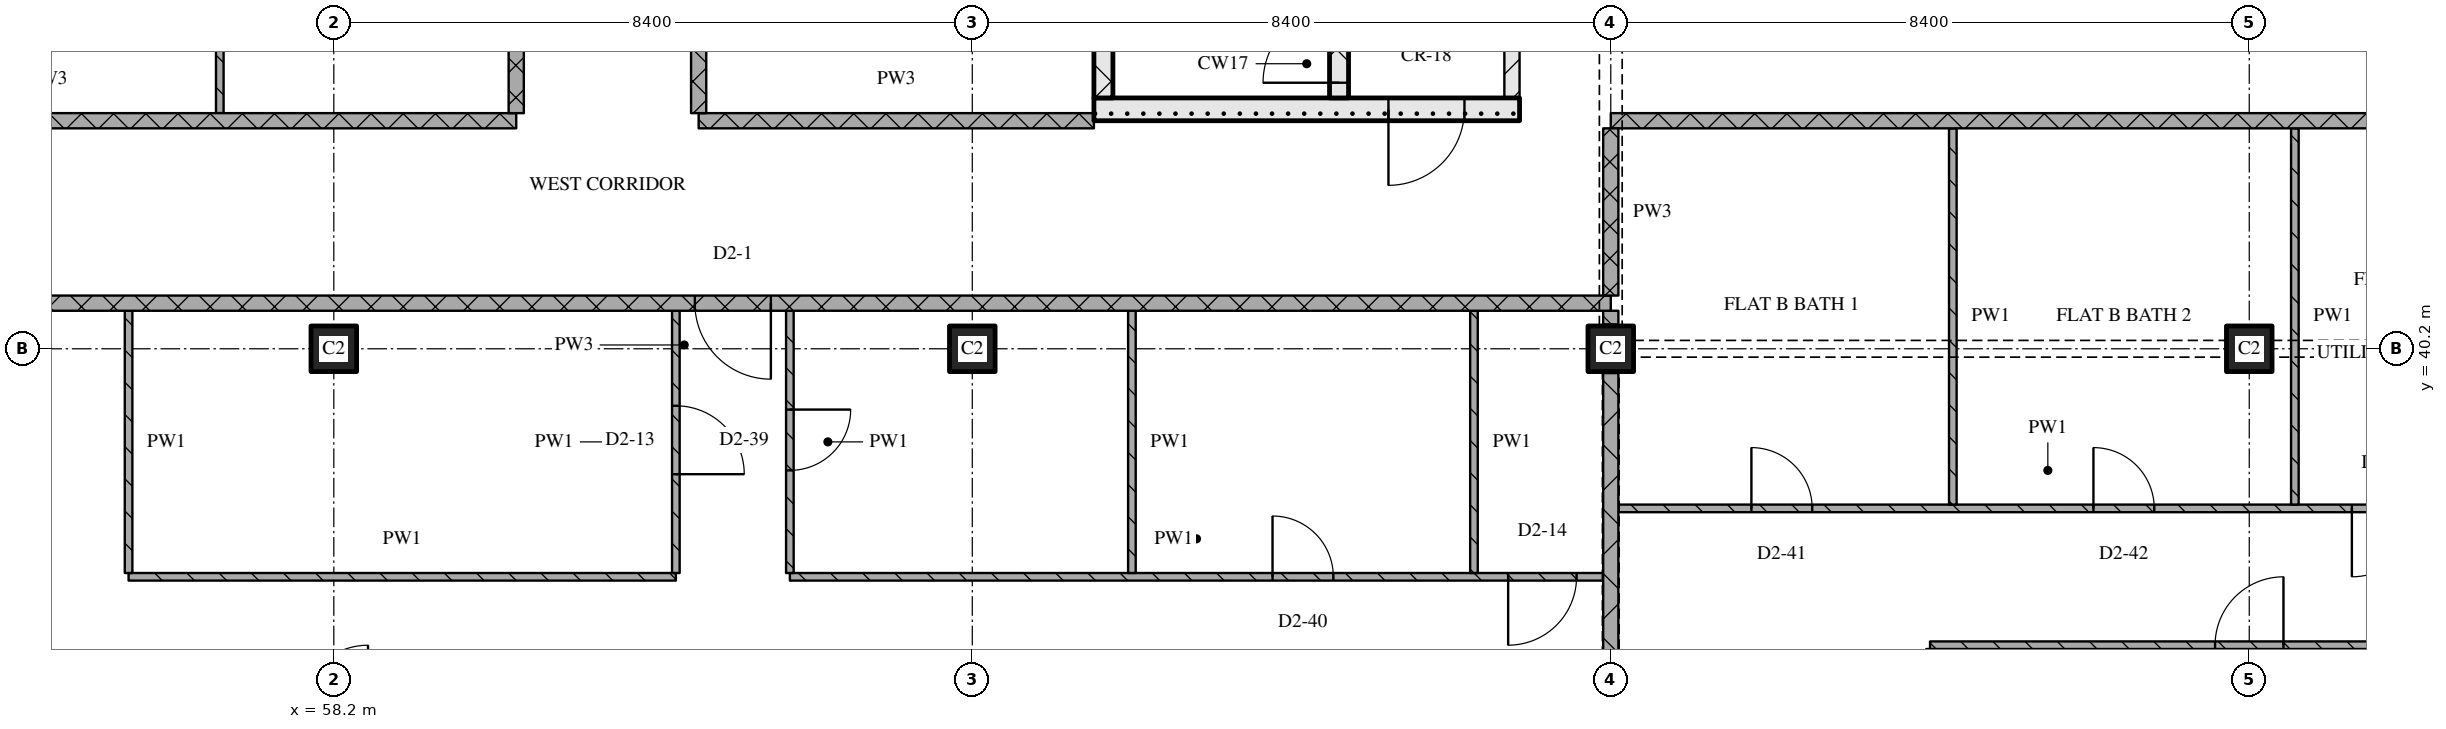
"""IFC4 building model, lengths in metres.
Left out: names, types, materials, properties, quantities, classifications, styles, units other than length and angle.
Written with IfcOpenShell. Run it as: python <this file> out.ifc"""

import sys

from ifc_helpers import new_model, si_unit, direction, frame, frame_2d, origin, origin_2d, place, context, subcontext, project, spatial, rectangle, extrude, element, fill, save


model = new_model("IFC4")
c1 = context("Model", 3, precision=1e-05, world=origin(), true_north=direction((0.0, 1.0)))
c2 = subcontext(c1, "Body", "Model", "MODEL_VIEW")
j1 = project(units=[si_unit("LENGTHUNIT", "METRE"), si_unit("PLANEANGLEUNIT", "RADIAN")], contexts=[c1])
p1 = place(None, origin())
s1 = spatial("IfcSite", under=j1, at=p1, CompositionType="ELEMENT")
p2 = place(p1, origin())
s2 = spatial("IfcBuilding", under=s1, at=p2, CompositionType="ELEMENT")
p3 = place(p2, frame((0.0, 0.0, 223.5)))
s3 = spatial("IfcBuildingStorey", under=s2, at=p3, CompositionType="ELEMENT", Elevation=223.5)
for number, where, z_axis, x_axis in (
    (1, (58.2, 40.2, 0.0), (0.0, 0.0, 1.0), (1.0, 0.0, 0.0)),
    (2, (66.6, 40.2, 0.0), (0.0, 0.0, 1.0), (1.0, 0.0, 0.0)),
    (3, (75.0, 40.2, 0.0), (0.0, 0.0, 1.0), (1.0, 0.0, 0.0)),
    (4, (83.4, 40.2, 0.0), (0.0, 0.0, 1.0), (1.0, 0.0, 0.0)),
):
    element("IfcColumn", number, at=place(p3, frame(where, z_axis=z_axis, x_axis=x_axis)), inside=s3, PredefinedType="COLUMN", context=c2, shape_type="SweptSolid", body=[
        extrude(rectangle(XDim=0.6, YDim=0.6, at=origin_2d()), origin(), (0.0, 0.0, 1.0), 3.6),
    ])
p4 = place(p3, frame((68.2, 43.35, 0.0), z_axis=(0.0, 0.0, 1.0), x_axis=(1.0, 0.0, 0.0)))
e5 = element("IfcWall", 5, at=p4, inside=s3, PredefinedType="SOLIDWALL", context=c2, shape_type="SweptSolid", body=[
    extrude(rectangle(XDim=5.6, YDim=0.3, at=frame_2d((2.8, 0.0))), origin(), (0.0, 0.0, 1.0), 3.32),
])
p5 = place(p4, frame((3.875, 0.0, 0.0)))
e6 = element("IfcOpeningElement", 6, at=p5, cuts=e5, PredefinedType="OPENING", context=c2, shape_type="SweptSolid", body=[
    extrude(rectangle(XDim=1.0, YDim=2.1, at=frame_2d((0.5, 1.05))), frame((0.0, 0.16, 0.0), z_axis=(0.0, -1.0, 0.0), x_axis=(1.0, 0.0, 0.0)), (0.0, 0.0, 1.0), 0.32),
])
p6 = place(p3, frame((68.325, 43.5, 0.0), z_axis=(0.0, 0.0, 1.0), x_axis=(0.0, 1.0, 0.0)))
e7 = element("IfcWall", 7, at=p6, inside=s3, PredefinedType="SOLIDWALL", context=c2, shape_type="SweptSolid", body=[
    extrude(rectangle(XDim=6.9, YDim=0.25, at=frame_2d((3.45, 0.0))), origin(), (0.0, 0.0, 1.0), 3.32),
])
p7 = place(p3, frame((71.425, 43.5, 0.0), z_axis=(0.0, 0.0, 1.0), x_axis=(0.0, 1.0, 0.0)))
e8 = element("IfcWall", 8, at=p7, inside=s3, PredefinedType="SOLIDWALL", context=c2, shape_type="SweptSolid", body=[
    extrude(rectangle(XDim=6.9, YDim=0.25, at=frame_2d((3.45, 0.0))), origin(), (0.0, 0.0, 1.0), 3.32),
])
p8 = place(p7, frame((0.2, 0.0, 0.0)))
e9 = element("IfcOpeningElement", 9, at=p8, cuts=e8, PredefinedType="OPENING", context=c2, shape_type="SweptSolid", body=[
    extrude(rectangle(XDim=1.0, YDim=2.1, at=frame_2d((0.5, 1.05))), frame((0.0, 0.135, 0.0), z_axis=(0.0, -1.0, 0.0), x_axis=(1.0, 0.0, 0.0)), (0.0, 0.0, 1.0), 0.27),
])
p9 = place(p3, frame((73.7, 43.5, 0.0), z_axis=(0.0, 0.0, 1.0), x_axis=(0.0, 1.0, 0.0)))
e10 = element("IfcWall", 10, at=p9, inside=s3, PredefinedType="PARTITIONING", context=c2, shape_type="SweptSolid", body=[
    extrude(rectangle(XDim=6.9, YDim=0.2, at=frame_2d((3.45, 0.0))), origin(), (0.0, 0.0, 1.0), 3.32),
])
p10 = place(p9, frame((1.0, 0.0, 0.0)))
e11 = element("IfcOpeningElement", 11, at=p10, cuts=e10, PredefinedType="OPENING", context=c2, shape_type="SweptSolid", body=[
    extrude(rectangle(XDim=1.0, YDim=2.1, at=frame_2d((0.5, 1.05))), frame((0.0, 0.11, 0.0), z_axis=(0.0, -1.0, 0.0), x_axis=(1.0, 0.0, 0.0)), (0.0, 0.0, 1.0), 0.22),
])
p11 = place(p3, frame((55.5, 37.2, 0.0), z_axis=(0.0, 0.0, 1.0), x_axis=(1.0, 0.0, 0.0)))
e12 = element("IfcWall", 12, at=p11, inside=s3, PredefinedType="PARTITIONING", context=c2, shape_type="SweptSolid", body=[
    extrude(rectangle(XDim=7.2, YDim=0.1, at=frame_2d((3.6, 0.0))), origin(), (0.0, 0.0, 1.0), 3.32),
])
p12 = place(p3, frame((64.2, 37.2, 0.0), z_axis=(0.0, 0.0, 1.0), x_axis=(1.0, 0.0, 0.0)))
e13 = element("IfcWall", 13, at=p12, inside=s3, PredefinedType="PARTITIONING", context=c2, shape_type="SweptSolid", body=[
    extrude(rectangle(XDim=10.7, YDim=0.1, at=frame_2d((5.35, 0.0))), origin(), (0.0, 0.0, 1.0), 3.32),
])
p13 = place(p12, frame((6.35, 0.0, 0.0)))
e14 = element("IfcOpeningElement", 14, at=p13, cuts=e13, PredefinedType="OPENING", context=c2, shape_type="SweptSolid", body=[
    extrude(rectangle(XDim=0.8, YDim=2.1, at=frame_2d((0.4, 1.05))), frame((0.0, 0.06, 0.0), z_axis=(0.0, -1.0, 0.0), x_axis=(1.0, 0.0, 0.0)), (0.0, 0.0, 1.0), 0.12),
])
p14 = place(p12, frame((9.45, 0.0, 0.0)))
e15 = element("IfcOpeningElement", 15, at=p14, cuts=e13, PredefinedType="OPENING", context=c2, shape_type="SweptSolid", body=[
    extrude(rectangle(XDim=0.9, YDim=2.1, at=frame_2d((0.45, 1.05))), frame((0.0, 0.06, 0.0), z_axis=(0.0, -1.0, 0.0), x_axis=(1.0, 0.0, 0.0)), (0.0, 0.0, 1.0), 0.12),
])
p15 = place(p3, frame((75.1, 38.1, 0.0), z_axis=(0.0, 0.0, 1.0), x_axis=(1.0, 0.0, 0.0)))
e16 = element("IfcWall", 16, at=p15, inside=s3, PredefinedType="PARTITIONING", context=c2, shape_type="SweptSolid", body=[
    extrude(rectangle(XDim=11.3, YDim=0.1, at=frame_2d((5.65, 0.0))), origin(), (0.0, 0.0, 1.0), 3.32),
])
p16 = place(p15, frame((1.75, 0.0, 0.0)))
e17 = element("IfcOpeningElement", 17, at=p16, cuts=e16, PredefinedType="OPENING", context=c2, shape_type="SweptSolid", body=[
    extrude(rectangle(XDim=0.8, YDim=2.1, at=frame_2d((0.4, 1.05))), frame((0.0, 0.06, 0.0), z_axis=(0.0, -1.0, 0.0), x_axis=(1.0, 0.0, 0.0)), (0.0, 0.0, 1.0), 0.12),
])
p17 = place(p15, frame((6.25, 0.0, 0.0)))
e18 = element("IfcOpeningElement", 18, at=p17, cuts=e16, PredefinedType="OPENING", context=c2, shape_type="SweptSolid", body=[
    extrude(rectangle(XDim=0.8, YDim=2.1, at=frame_2d((0.4, 1.05))), frame((0.0, 0.06, 0.0), z_axis=(0.0, -1.0, 0.0), x_axis=(1.0, 0.0, 0.0)), (0.0, 0.0, 1.0), 0.12),
])
p18 = place(p15, frame((9.65, 0.0, 0.0)))
e19 = element("IfcOpeningElement", 19, at=p18, cuts=e16, PredefinedType="OPENING", context=c2, shape_type="SweptSolid", body=[
    extrude(rectangle(XDim=0.9, YDim=2.1, at=frame_2d((0.45, 1.05))), frame((0.0, 0.06, 0.0), z_axis=(0.0, -1.0, 0.0), x_axis=(1.0, 0.0, 0.0)), (0.0, 0.0, 1.0), 0.12),
])
p19 = place(p3, frame((75.0, 40.8, 0.0), z_axis=(0.0, 0.0, 1.0), x_axis=(-1.0, 0.0, 0.0)))
e20 = element("IfcWall", 20, at=p19, inside=s3, PredefinedType="PARTITIONING", context=c2, shape_type="SweptSolid", body=[
    extrude(rectangle(XDim=24.38, YDim=0.2, at=frame_2d((12.19, 0.0))), origin(), (0.0, 0.0, 1.0), 3.32),
])
p20 = place(p19, frame((11.05, 0.0, 0.0)))
e21 = element("IfcOpeningElement", 21, at=p20, cuts=e20, PredefinedType="OPENING", context=c2, shape_type="SweptSolid", body=[
    extrude(rectangle(XDim=1.0, YDim=2.1, at=frame_2d((0.5, 1.05))), frame((0.0, 0.11, 0.0), z_axis=(0.0, -1.0, 0.0), x_axis=(1.0, 0.0, 0.0)), (0.0, 0.0, 1.0), 0.22),
])
p21 = place(p3, frame((48.28, 43.2, 0.0), z_axis=(0.0, 0.0, 1.0), x_axis=(1.0, 0.0, 0.0)))
e22 = element("IfcWall", 22, at=p21, inside=s3, PredefinedType="PARTITIONING", context=c2, shape_type="SweptSolid", body=[
    extrude(rectangle(XDim=12.32, YDim=0.2, at=frame_2d((6.16, 0.0))), origin(), (0.0, 0.0, 1.0), 3.32),
])
p22 = place(p3, frame((63.0, 43.2, 0.0), z_axis=(0.0, 0.0, 1.0), x_axis=(1.0, 0.0, 0.0)))
e23 = element("IfcWall", 23, at=p22, inside=s3, PredefinedType="PARTITIONING", context=c2, shape_type="SweptSolid", body=[
    extrude(rectangle(XDim=5.2, YDim=0.2, at=frame_2d((2.6, 0.0))), origin(), (0.0, 0.0, 1.0), 3.32),
])
p23 = place(p3, frame((100.2, 43.2, 0.0), z_axis=(0.0, 0.0, 1.0), x_axis=(-1.0, 0.0, 0.0)))
e24 = element("IfcWall", 24, at=p23, inside=s3, PredefinedType="PARTITIONING", context=c2, shape_type="SweptSolid", body=[
    extrude(rectangle(XDim=25.2, YDim=0.2, at=frame_2d((12.6, 0.0))), origin(), (0.0, 0.0, 1.0), 3.32),
])
p24 = place(p23, frame((12.55, 0.0, 0.0)))
e25 = element("IfcOpeningElement", 25, at=p24, cuts=e24, PredefinedType="OPENING", context=c2, shape_type="SweptSolid", body=[
    extrude(rectangle(XDim=1.0, YDim=2.1, at=frame_2d((0.5, 1.05))), frame((0.0, 0.11, 0.0), z_axis=(0.0, -1.0, 0.0), x_axis=(1.0, 0.0, 0.0)), (0.0, 0.0, 1.0), 0.22),
])
p25 = place(p3, frame((55.5, 40.7, 0.0), z_axis=(0.0, 0.0, 1.0), x_axis=(0.0, -1.0, 0.0)))
e26 = element("IfcWall", 26, at=p25, inside=s3, PredefinedType="PARTITIONING", context=c2, shape_type="SweptSolid", body=[
    extrude(rectangle(XDim=3.45, YDim=0.1, at=frame_2d((1.725, 0.0))), origin(), (0.0, 0.0, 1.0), 3.32),
])
p26 = place(p3, frame((56.7, 50.05, 0.0), z_axis=(0.0, 0.0, 1.0), x_axis=(0.0, -1.0, 0.0)))
e27 = element("IfcWall", 27, at=p26, inside=s3, PredefinedType="PARTITIONING", context=c2, shape_type="SweptSolid", body=[
    extrude(rectangle(XDim=6.75, YDim=0.1, at=frame_2d((3.375, 0.0))), origin(), (0.0, 0.0, 1.0), 3.32),
])
p27 = place(p26, frame((4.2, 0.0, 0.0)))
e28 = element("IfcOpeningElement", 28, at=p27, cuts=e27, PredefinedType="OPENING", context=c2, shape_type="SweptSolid", body=[
    extrude(rectangle(XDim=0.8, YDim=2.1, at=frame_2d((0.4, 1.05))), frame((0.0, 0.06, 0.0), z_axis=(0.0, -1.0, 0.0), x_axis=(1.0, 0.0, 0.0)), (0.0, 0.0, 1.0), 0.12),
])
p28 = place(p3, frame((60.6, 43.3, 0.0), z_axis=(0.0, 0.0, 1.0), x_axis=(0.0, 1.0, 0.0)))
e29 = element("IfcWall", 29, at=p28, inside=s3, PredefinedType="PARTITIONING", context=c2, shape_type="SweptSolid", body=[
    extrude(rectangle(XDim=17.8, YDim=0.2, at=frame_2d((8.9, 0.0))), origin(), (0.0, 0.0, 1.0), 3.32),
])
p29 = place(p28, frame((7.05, 0.0, 0.0)))
e30 = element("IfcOpeningElement", 30, at=p29, cuts=e29, PredefinedType="OPENING", context=c2, shape_type="SweptSolid", body=[
    extrude(rectangle(XDim=1.0, YDim=2.1, at=frame_2d((0.5, 1.05))), frame((0.0, 0.11, 0.0), z_axis=(0.0, -1.0, 0.0), x_axis=(1.0, 0.0, 0.0)), (0.0, 0.0, 1.0), 0.22),
])
p30 = place(p3, frame((62.7, 37.25, 0.0), z_axis=(0.0, 0.0, 1.0), x_axis=(0.0, 1.0, 0.0)))
e31 = element("IfcWall", 31, at=p30, inside=s3, PredefinedType="PARTITIONING", context=c2, shape_type="SweptSolid", body=[
    extrude(rectangle(XDim=3.45, YDim=0.1, at=frame_2d((1.725, 0.0))), origin(), (0.0, 0.0, 1.0), 3.32),
])
p31 = place(p30, frame((1.3, 0.0, 0.0)))
e32 = element("IfcOpeningElement", 32, at=p31, cuts=e31, PredefinedType="OPENING", context=c2, shape_type="SweptSolid", body=[
    extrude(rectangle(XDim=0.9, YDim=2.1, at=frame_2d((0.45, 1.05))), frame((0.0, 0.06, 0.0), z_axis=(0.0, -1.0, 0.0), x_axis=(1.0, 0.0, 0.0)), (0.0, 0.0, 1.0), 0.12),
])
p32 = place(p3, frame((63.0, 58.7, 0.0), z_axis=(0.0, 0.0, 1.0), x_axis=(0.0, -1.0, 0.0)))
e33 = element("IfcWall", 33, at=p32, inside=s3, PredefinedType="PARTITIONING", context=c2, shape_type="SweptSolid", body=[
    extrude(rectangle(XDim=15.4, YDim=0.2, at=frame_2d((7.7, 0.0))), origin(), (0.0, 0.0, 1.0), 3.32),
])
p33 = place(p32, frame((3.45, 0.0, 0.0)))
e34 = element("IfcOpeningElement", 34, at=p33, cuts=e33, PredefinedType="OPENING", context=c2, shape_type="SweptSolid", body=[
    extrude(rectangle(XDim=1.0, YDim=2.1, at=frame_2d((0.5, 1.05))), frame((0.0, 0.11, 0.0), z_axis=(0.0, -1.0, 0.0), x_axis=(1.0, 0.0, 0.0)), (0.0, 0.0, 1.0), 0.22),
])
p34 = place(p32, frame((11.25, 0.0, 0.0)))
e35 = element("IfcOpeningElement", 35, at=p34, cuts=e33, PredefinedType="OPENING", context=c2, shape_type="SweptSolid", body=[
    extrude(rectangle(XDim=0.9, YDim=2.1, at=frame_2d((0.45, 1.05))), frame((0.0, 0.11, 0.0), z_axis=(0.0, -1.0, 0.0), x_axis=(1.0, 0.0, 0.0)), (0.0, 0.0, 1.0), 0.22),
])
p35 = place(p3, frame((64.2, 40.7, 0.0), z_axis=(0.0, 0.0, 1.0), x_axis=(0.0, -1.0, 0.0)))
e36 = element("IfcWall", 36, at=p35, inside=s3, PredefinedType="PARTITIONING", context=c2, shape_type="SweptSolid", body=[
    extrude(rectangle(XDim=3.45, YDim=0.1, at=frame_2d((1.725, 0.0))), origin(), (0.0, 0.0, 1.0), 3.32),
])
p36 = place(p35, frame((1.3, 0.0, 0.0)))
e37 = element("IfcOpeningElement", 37, at=p36, cuts=e36, PredefinedType="OPENING", context=c2, shape_type="SweptSolid", body=[
    extrude(rectangle(XDim=0.8, YDim=2.1, at=frame_2d((0.4, 1.05))), frame((0.0, 0.06, 0.0), z_axis=(0.0, -1.0, 0.0), x_axis=(1.0, 0.0, 0.0)), (0.0, 0.0, 1.0), 0.12),
])
for number, where, z_axis, x_axis in (
    (38, (68.7, 40.7, 0.0), (0.0, 0.0, 1.0), (0.0, -1.0, 0.0)),
    (39, (73.2, 40.7, 0.0), (0.0, 0.0, 1.0), (0.0, -1.0, 0.0)),
):
    element("IfcWall", number, at=place(p3, frame(where, z_axis=z_axis, x_axis=x_axis)), inside=s3, PredefinedType="PARTITIONING", context=c2, shape_type="SweptSolid", body=[
        extrude(rectangle(XDim=3.45, YDim=0.1, at=frame_2d((1.725, 0.0))), origin(), (0.0, 0.0, 1.0), 3.32),
    ])
p37 = place(p3, frame((75.0, 43.1, 0.0), z_axis=(0.0, 0.0, 1.0), x_axis=(0.0, -1.0, 0.0)))
e40 = element("IfcWall", 40, at=p37, inside=s3, PredefinedType="PARTITIONING", context=c2, shape_type="SweptSolid", body=[
    extrude(rectangle(XDim=2.2, YDim=0.2, at=frame_2d((1.1, 0.0))), origin(), (0.0, 0.0, 1.0), 2.53),
])
p38 = place(p3, frame((75.0, 39.88, 0.0), z_axis=(0.0, 0.0, 1.0), x_axis=(0.0, -1.0, 0.0)))
e41 = element("IfcWall", 41, at=p38, inside=s3, PredefinedType="PARTITIONING", context=c2, shape_type="SweptSolid", body=[
    extrude(rectangle(XDim=7.76, YDim=0.2, at=frame_2d((3.88, 0.0))), origin(), (0.0, 0.0, 1.0), 2.72),
])
p39 = place(p3, frame((75.0, 40.7, 0.0), z_axis=(0.0, 0.0, 1.0), x_axis=(0.0, -1.0, 0.0)))
e42 = element("IfcWall", 42, at=p39, inside=s3, PredefinedType="PARTITIONING", context=c2, shape_type="SweptSolid", body=[
    extrude(rectangle(XDim=0.18, YDim=0.2, at=frame_2d((0.09, 0.0))), origin(), (0.0, 0.0, 1.0), 3.32),
])
p40 = place(p3, frame((79.2, 36.25, 0.0), z_axis=(0.0, 0.0, 1.0), x_axis=(0.0, -1.0, 0.0)))
e43 = element("IfcWall", 43, at=p40, inside=s3, PredefinedType="PARTITIONING", context=c2, shape_type="SweptSolid", body=[
    extrude(rectangle(XDim=5.97, YDim=0.1, at=frame_2d((2.985, 0.0))), origin(), (0.0, 0.0, 1.0), 3.32),
])
for number, where, z_axis, x_axis in (
    (44, (79.5, 43.1, 0.0), (0.0, 0.0, 1.0), (0.0, -1.0, 0.0)),
    (45, (84.0, 43.1, 0.0), (0.0, 0.0, 1.0), (0.0, -1.0, 0.0)),
):
    element("IfcWall", number, at=place(p3, frame(where, z_axis=z_axis, x_axis=x_axis)), inside=s3, PredefinedType="PARTITIONING", context=c2, shape_type="SweptSolid", body=[
        extrude(rectangle(XDim=4.95, YDim=0.1, at=frame_2d((2.475, 0.0))), origin(), (0.0, 0.0, 1.0), 3.32),
    ])
p41 = place(p3, frame((100.1, 36.3, 0.0), z_axis=(0.0, 0.0, 1.0), x_axis=(-1.0, 0.0, 0.0)))
e46 = element("IfcWall", 46, at=p41, inside=s3, PredefinedType="PARTITIONING", context=c2, shape_type="SweptSolid", body=[
    extrude(rectangle(XDim=20.9, YDim=0.1, at=frame_2d((10.45, 0.0))), origin(), (0.0, 0.0, 1.0), 3.32),
])
p42 = place(p41, frame((1.55, 0.0, 0.0)))
e47 = element("IfcOpeningElement", 47, at=p42, cuts=e46, PredefinedType="OPENING", context=c2, shape_type="SweptSolid", body=[
    extrude(rectangle(XDim=0.9, YDim=2.1, at=frame_2d((0.45, 1.05))), frame((0.0, 0.06, 0.0), z_axis=(0.0, -1.0, 0.0), x_axis=(1.0, 0.0, 0.0)), (0.0, 0.0, 1.0), 0.12),
])
p43 = place(p41, frame((7.85, 0.0, 0.0)))
e48 = element("IfcOpeningElement", 48, at=p43, cuts=e46, PredefinedType="OPENING", context=c2, shape_type="SweptSolid", body=[
    extrude(rectangle(XDim=0.9, YDim=2.1, at=frame_2d((0.45, 1.05))), frame((0.0, 0.06, 0.0), z_axis=(0.0, -1.0, 0.0), x_axis=(1.0, 0.0, 0.0)), (0.0, 0.0, 1.0), 0.12),
])
p44 = place(p41, frame((16.25, 0.0, 0.0)))
e49 = element("IfcOpeningElement", 49, at=p44, cuts=e46, PredefinedType="OPENING", context=c2, shape_type="SweptSolid", body=[
    extrude(rectangle(XDim=0.9, YDim=2.1, at=frame_2d((0.45, 1.05))), frame((0.0, 0.06, 0.0), z_axis=(0.0, -1.0, 0.0), x_axis=(1.0, 0.0, 0.0)), (0.0, 0.0, 1.0), 0.12),
])
p45 = place(p5, origin())
e50 = element("IfcDoor", 50, at=p45, inside=s3, OperationType="SINGLE_SWING_RIGHT", PredefinedType="DOOR", context=c2, shape_type="SweptSolid", body=[
    extrude(rectangle(XDim=1.0, YDim=2.1, at=frame_2d((0.5, 1.05))), frame((0.0, 0.025, 0.0), z_axis=(0.0, -1.0, 0.0), x_axis=(1.0, 0.0, 0.0)), (0.0, 0.0, 1.0), 0.05),
])
fill(e6, e50)
p46 = place(p8, origin())
e51 = element("IfcDoor", 51, at=p46, inside=s3, OperationType="SINGLE_SWING_LEFT", PredefinedType="DOOR", context=c2, shape_type="SweptSolid", body=[
    extrude(rectangle(XDim=1.0, YDim=2.1, at=frame_2d((0.5, 1.05))), frame((0.0, 0.025, 0.0), z_axis=(0.0, -1.0, 0.0), x_axis=(1.0, 0.0, 0.0)), (0.0, 0.0, 1.0), 0.05),
])
fill(e9, e51)
p47 = place(p13, origin())
e52 = element("IfcDoor", 52, at=p47, inside=s3, OperationType="SINGLE_SWING_LEFT", PredefinedType="DOOR", context=c2, shape_type="SweptSolid", body=[
    extrude(rectangle(XDim=0.8, YDim=2.1, at=frame_2d((0.4, 1.05))), frame((0.0, 0.025, 0.0), z_axis=(0.0, -1.0, 0.0), x_axis=(1.0, 0.0, 0.0)), (0.0, 0.0, 1.0), 0.05),
])
fill(e14, e52)
p48 = place(p14, origin())
e53 = element("IfcDoor", 53, at=p48, inside=s3, OperationType="SINGLE_SWING_RIGHT", PredefinedType="DOOR", context=c2, shape_type="SweptSolid", body=[
    extrude(rectangle(XDim=0.9, YDim=2.1, at=frame_2d((0.45, 1.05))), frame((0.0, 0.025, 0.0), z_axis=(0.0, -1.0, 0.0), x_axis=(1.0, 0.0, 0.0)), (0.0, 0.0, 1.0), 0.05),
])
fill(e15, e53)
p49 = place(p16, origin())
e54 = element("IfcDoor", 54, at=p49, inside=s3, OperationType="SINGLE_SWING_LEFT", PredefinedType="DOOR", context=c2, shape_type="SweptSolid", body=[
    extrude(rectangle(XDim=0.8, YDim=2.1, at=frame_2d((0.4, 1.05))), frame((0.0, 0.025, 0.0), z_axis=(0.0, -1.0, 0.0), x_axis=(1.0, 0.0, 0.0)), (0.0, 0.0, 1.0), 0.05),
])
fill(e17, e54)
p50 = place(p17, origin())
e55 = element("IfcDoor", 55, at=p50, inside=s3, OperationType="SINGLE_SWING_LEFT", PredefinedType="DOOR", context=c2, shape_type="SweptSolid", body=[
    extrude(rectangle(XDim=0.8, YDim=2.1, at=frame_2d((0.4, 1.05))), frame((0.0, 0.025, 0.0), z_axis=(0.0, -1.0, 0.0), x_axis=(1.0, 0.0, 0.0)), (0.0, 0.0, 1.0), 0.05),
])
fill(e18, e55)
p51 = place(p18, origin())
e56 = element("IfcDoor", 56, at=p51, inside=s3, OperationType="SINGLE_SWING_RIGHT", PredefinedType="DOOR", context=c2, shape_type="SweptSolid", body=[
    extrude(rectangle(XDim=0.9, YDim=2.1, at=frame_2d((0.45, 1.05))), frame((0.0, 0.025, 0.0), z_axis=(0.0, -1.0, 0.0), x_axis=(1.0, 0.0, 0.0)), (0.0, 0.0, 1.0), 0.05),
])
fill(e19, e56)
p52 = place(p20, origin())
e57 = element("IfcDoor", 57, at=p52, inside=s3, OperationType="SINGLE_SWING_LEFT", PredefinedType="DOOR", context=c2, shape_type="SweptSolid", body=[
    extrude(rectangle(XDim=1.0, YDim=2.1, at=frame_2d((0.5, 1.05))), frame((0.0, 0.025, 0.0), z_axis=(0.0, -1.0, 0.0), x_axis=(1.0, 0.0, 0.0)), (0.0, 0.0, 1.0), 0.05),
])
fill(e21, e57)
p53 = place(p31, origin())
e58 = element("IfcDoor", 58, at=p53, inside=s3, OperationType="SINGLE_SWING_RIGHT", PredefinedType="DOOR", context=c2, shape_type="SweptSolid", body=[
    extrude(rectangle(XDim=0.9, YDim=2.1, at=frame_2d((0.45, 1.05))), frame((0.0, 0.025, 0.0), z_axis=(0.0, -1.0, 0.0), x_axis=(1.0, 0.0, 0.0)), (0.0, 0.0, 1.0), 0.05),
])
fill(e32, e58)
p54 = place(p36, origin())
e59 = element("IfcDoor", 59, at=p54, inside=s3, OperationType="SINGLE_SWING_LEFT", PredefinedType="DOOR", context=c2, shape_type="SweptSolid", body=[
    extrude(rectangle(XDim=0.8, YDim=2.1, at=frame_2d((0.4, 1.05))), frame((0.0, 0.025, 0.0), z_axis=(0.0, -1.0, 0.0), x_axis=(1.0, 0.0, 0.0)), (0.0, 0.0, 1.0), 0.05),
])
fill(e37, e59)
p55 = place(p44, origin())
e60 = element("IfcDoor", 60, at=p55, inside=s3, OperationType="SINGLE_SWING_RIGHT", PredefinedType="DOOR", context=c2, shape_type="SweptSolid", body=[
    extrude(rectangle(XDim=0.9, YDim=2.1, at=frame_2d((0.45, 1.05))), frame((0.0, 0.025, 0.0), z_axis=(0.0, -1.0, 0.0), x_axis=(1.0, 0.0, 0.0)), (0.0, 0.0, 1.0), 0.05),
])
fill(e49, e60)
save(model, sys.argv[1])
